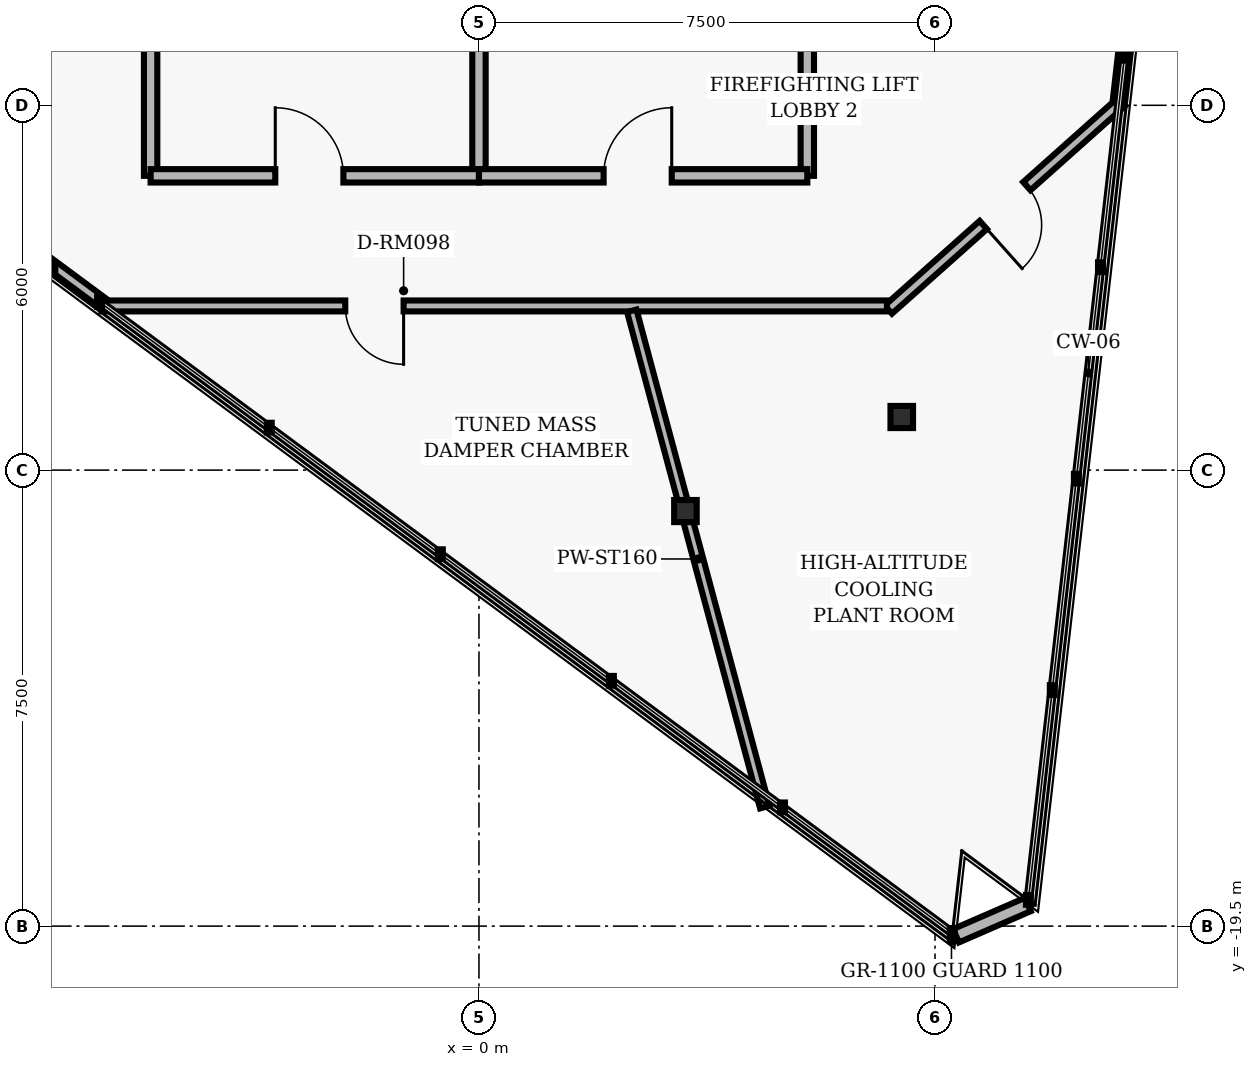
"""IFC4 building model, lengths in metres.
Left out: names, types, materials, properties, quantities, classifications, styles, units other than length and angle.
Written with IfcOpenShell. Run it as: python <this file> out.ifc"""

import sys

from ifc_helpers import new_model, si_unit, direction, frame, frame_2d, origin, origin_2d, place, context, subcontext, project, spatial, rectangle, i_section, extrude, element, fill, save


model = new_model("IFC4")
c1 = context("Model", 3, precision=1e-05, world=origin(), true_north=direction((0.0, 1.0)))
c2 = subcontext(c1, "Body", "Model", "MODEL_VIEW")
j1 = project(units=[si_unit("LENGTHUNIT", "METRE"), si_unit("PLANEANGLEUNIT", "RADIAN")], contexts=[c1])
p1 = place(None, origin())
s1 = spatial("IfcSite", under=j1, at=p1, CompositionType="ELEMENT")
p2 = place(p1, origin())
s2 = spatial("IfcBuilding", under=s1, at=p2, CompositionType="ELEMENT")
p3 = place(p2, frame((0.0, 0.0, 239.2)))
s3 = spatial("IfcBuildingStorey", under=s2, at=p3, CompositionType="ELEMENT", Elevation=239.2)
for number, where, z_axis, x_axis in (
    (1, (6.953, -11.127, 0.0), (0.0, 0.0, 1.0), (1.0, 0.0, 0.0)),
    (2, (3.396, -12.674, 0.0), (0.0, 0.0, 1.0), (1.0, 0.0, 0.0)),
):
    element("IfcColumn", number, at=place(p3, frame(where, z_axis=z_axis, x_axis=x_axis)), inside=s3, PredefinedType="COLUMN", context=c2, shape_type="SweptSolid", body=[
        extrude(i_section(OverallWidth=0.371, OverallDepth=0.364, WebThickness=0.013, FlangeThickness=0.022, FilletRadius=0.015, at=origin_2d()), origin(), (0.0, 0.0, 1.0), 4.16),
    ])
p4 = place(p3, frame((7.845, -19.659, 0.0), z_axis=(0.0, 0.0, 1.0), x_axis=(0.917064030228, 0.398739970986, 0.0)))
e3 = element("IfcWall", 3, at=p4, inside=s3, PredefinedType="PARAPET", context=c2, shape_type="SweptSolid", body=[
    extrude(rectangle(XDim=1.288, YDim=0.24, at=frame_2d((0.644, 0.0))), origin(), (0.0, 0.0, 1.0), 3.448),
])
for number, where, z_axis, x_axis in (
    (4, (-5.4, -7.16, 0.0), (0.0, 0.0, 1.0), (0.0, 1.0, 0.0)),
    (5, (5.4, -7.16, 0.0), (0.0, 0.0, 1.0), (0.0, 1.0, 0.0)),
):
    element("IfcWall", number, at=place(p3, frame(where, z_axis=z_axis, x_axis=x_axis)), inside=s3, PredefinedType="PARTITIONING", context=c2, shape_type="SweptSolid", body=[
        extrude(rectangle(XDim=2.71, YDim=0.22, at=frame_2d((1.355, 0.0))), origin(), (0.0, 0.0, 1.0), 3.903),
    ])
p5 = place(p3, frame((0.0, -7.16, 0.0), z_axis=(0.0, 0.0, 1.0), x_axis=(0.0, 1.0, 0.0)))
e6 = element("IfcWall", 6, at=p5, inside=s3, PredefinedType="PARTITIONING", context=c2, shape_type="SweptSolid", body=[
    extrude(rectangle(XDim=2.81, YDim=0.22, at=frame_2d((1.405, 0.0))), origin(), (0.0, 0.0, 1.0), 3.903),
])
p6 = place(p3, frame((-5.4, -7.16, 0.0), z_axis=(0.0, 0.0, 1.0), x_axis=(1.0, 0.0, 0.0)))
e7 = element("IfcWall", 7, at=p6, inside=s3, PredefinedType="PARTITIONING", context=c2, shape_type="SweptSolid", body=[
    extrude(rectangle(XDim=5.4, YDim=0.22, at=frame_2d((2.7, 0.0))), origin(), (0.0, 0.0, 1.0), 3.903),
])
p7 = place(p6, frame((2.05, 0.0, 0.0)))
e8 = element("IfcOpeningElement", 8, at=p7, cuts=e7, PredefinedType="OPENING", context=c2, shape_type="SweptSolid", body=[
    extrude(rectangle(XDim=1.12, YDim=2.02, at=frame_2d((0.56, 1.01))), frame((0.0, 0.12, 0.0), z_axis=(0.0, -1.0, 0.0), x_axis=(1.0, 0.0, 0.0)), (0.0, 0.0, 1.0), 0.24),
])
p8 = place(p3, frame((0.0, -7.16, 0.0), z_axis=(0.0, 0.0, 1.0), x_axis=(1.0, 0.0, 0.0)))
e9 = element("IfcWall", 9, at=p8, inside=s3, PredefinedType="PARTITIONING", context=c2, shape_type="SweptSolid", body=[
    extrude(rectangle(XDim=5.4, YDim=0.22, at=frame_2d((2.7, 0.0))), origin(), (0.0, 0.0, 1.0), 3.903),
])
p9 = place(p8, frame((2.05, 0.0, 0.0)))
e10 = element("IfcOpeningElement", 10, at=p9, cuts=e9, PredefinedType="OPENING", context=c2, shape_type="SweptSolid", body=[
    extrude(rectangle(XDim=1.12, YDim=2.02, at=frame_2d((0.56, 1.01))), frame((0.0, 0.12, 0.0), z_axis=(0.0, -1.0, 0.0), x_axis=(1.0, 0.0, 0.0)), (0.0, 0.0, 1.0), 0.24),
])
p10 = place(p3, frame((11.402, 1.881, 0.0), z_axis=(0.0, 0.0, 1.0), x_axis=(-0.113226899453, -0.993569156748, 0.0)))
e11 = element("IfcWall", 11, at=p10, inside=s3, PredefinedType="PARTITIONING", context=c2, shape_type="SweptSolid", body=[
    extrude(rectangle(XDim=7.84, YDim=0.18, at=frame_2d((3.92, 0.0))), origin(), (0.0, 0.0, 1.0), 3.903),
])
p11 = place(p3, frame((10.572, -5.938, 0.0), z_axis=(0.0, 0.0, 1.0), x_axis=(-0.746510195803, -0.665373975717, 0.0)))
e12 = element("IfcWall", 12, at=p11, inside=s3, PredefinedType="PARTITIONING", context=c2, shape_type="SweptSolid", body=[
    extrude(rectangle(XDim=5.142, YDim=0.18, at=frame_2d((2.571, 0.0))), origin(), (0.0, 0.0, 1.0), 3.903),
])
p12 = place(p11, frame((2.091, 0.0, 0.0)))
e13 = element("IfcOpeningElement", 13, at=p12, cuts=e12, PredefinedType="OPENING", context=c2, shape_type="SweptSolid", body=[
    extrude(rectangle(XDim=0.96, YDim=2.02, at=frame_2d((0.48, 1.01))), frame((0.0, 0.1, 0.0), z_axis=(0.0, -1.0, 0.0), x_axis=(1.0, 0.0, 0.0)), (0.0, 0.0, 1.0), 0.2),
])
p13 = place(p3, frame((6.71, -9.3, 0.0), z_axis=(0.0, 0.0, 1.0), x_axis=(-1.0, 0.0, 0.0)))
e14 = element("IfcWall", 14, at=p13, inside=s3, PredefinedType="PARTITIONING", context=c2, shape_type="SweptSolid", body=[
    extrude(rectangle(XDim=12.92, YDim=0.18, at=frame_2d((6.46, 0.0))), origin(), (0.0, 0.0, 1.0), 3.903),
])
p14 = place(p13, frame((7.949, 0.0, 0.0)))
e15 = element("IfcOpeningElement", 15, at=p14, cuts=e14, PredefinedType="OPENING", context=c2, shape_type="SweptSolid", body=[
    extrude(rectangle(XDim=0.96, YDim=2.02, at=frame_2d((0.48, 1.01))), frame((0.0, 0.1, 0.0), z_axis=(0.0, -1.0, 0.0), x_axis=(1.0, 0.0, 0.0)), (0.0, 0.0, 1.0), 0.2),
])
p15 = place(p3, frame((-6.192, -9.247, 0.0), z_axis=(0.0, 0.0, 1.0), x_axis=(-0.803841424004, 0.594843647571, 0.0)))
e16 = element("IfcWall", 16, at=p15, inside=s3, PredefinedType="PARTITIONING", context=c2, shape_type="SweptSolid", body=[
    extrude(rectangle(XDim=4.913, YDim=0.18, at=frame_2d((2.457, 0.0))), origin(), (0.0, 0.0, 1.0), 3.903),
])
p16 = place(p3, frame((2.513, -9.38, 0.0), z_axis=(0.0, 0.0, 1.0), x_axis=(0.258807801758, -0.965928838864, 0.0)))
e17 = element("IfcWall", 17, at=p16, inside=s3, PredefinedType="PARTITIONING", context=c2, shape_type="SweptSolid", body=[
    extrude(rectangle(XDim=8.451, YDim=0.16, at=frame_2d((4.226, 0.0))), origin(), (0.0, 0.0, 1.0), 3.903),
])
p17 = place(p7, origin())
e18 = element("IfcDoor", 18, at=p17, inside=s3, OperationType="SINGLE_SWING_LEFT", PredefinedType="DOOR", context=c2, shape_type="SweptSolid", body=[
    extrude(rectangle(XDim=1.12, YDim=2.02, at=frame_2d((0.56, 1.01))), frame((0.0, 0.025, 0.0), z_axis=(0.0, -1.0, 0.0), x_axis=(1.0, 0.0, 0.0)), (0.0, 0.0, 1.0), 0.05),
])
fill(e8, e18)
p18 = place(p9, origin())
e19 = element("IfcDoor", 19, at=p18, inside=s3, OperationType="SINGLE_SWING_RIGHT", PredefinedType="DOOR", context=c2, shape_type="SweptSolid", body=[
    extrude(rectangle(XDim=1.12, YDim=2.02, at=frame_2d((0.56, 1.01))), frame((0.0, 0.025, 0.0), z_axis=(0.0, -1.0, 0.0), x_axis=(1.0, 0.0, 0.0)), (0.0, 0.0, 1.0), 0.05),
])
fill(e10, e19)
p19 = place(p14, origin())
e20 = element("IfcDoor", 20, at=p19, inside=s3, OperationType="SINGLE_SWING_LEFT", PredefinedType="DOOR", context=c2, shape_type="SweptSolid", body=[
    extrude(rectangle(XDim=0.96, YDim=2.02, at=frame_2d((0.48, 1.01))), frame((0.0, 0.025, 0.0), z_axis=(0.0, -1.0, 0.0), x_axis=(1.0, 0.0, 0.0)), (0.0, 0.0, 1.0), 0.05),
])
fill(e15, e20)
p20 = place(p12, origin())
e21 = element("IfcDoor", 21, at=p20, inside=s3, OperationType="SINGLE_SWING_RIGHT", PredefinedType="DOOR", context=c2, shape_type="SweptSolid", body=[
    extrude(rectangle(XDim=0.96, YDim=2.02, at=frame_2d((0.48, 1.01))), frame((0.0, 0.025, 0.0), z_axis=(0.0, -1.0, 0.0), x_axis=(1.0, 0.0, 0.0)), (0.0, 0.0, 1.0), 0.05),
])
fill(e13, e21)
save(model, sys.argv[1])
